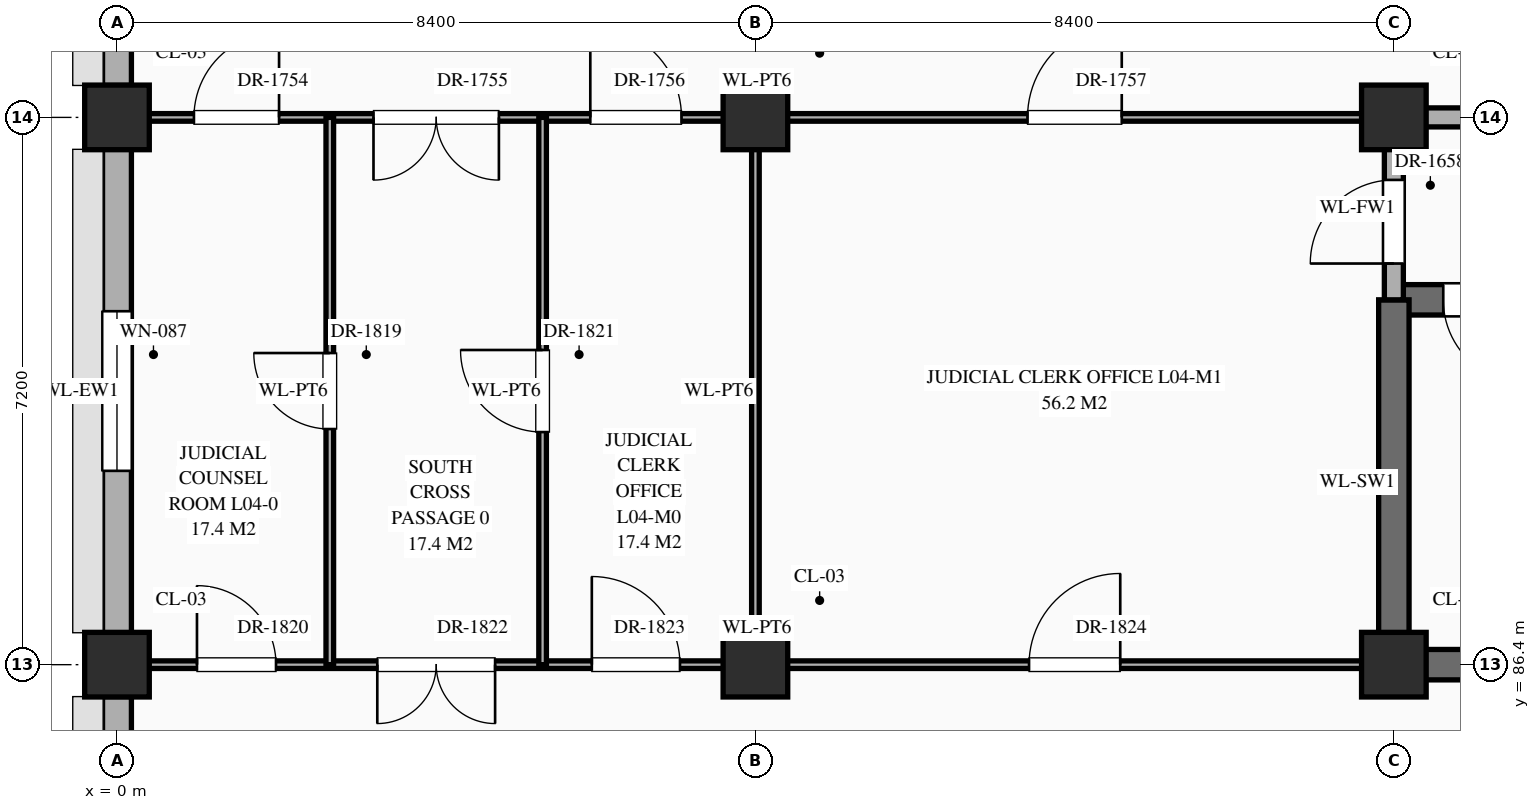
"""IFC4 building model, lengths in metres.
Left out: names, types, materials, properties, quantities, classifications, styles, units other than length and angle.
Written with IfcOpenShell. Run it as: python <this file> out.ifc"""

import sys

from ifc_helpers import new_model, si_unit, direction, frame, frame_2d, origin, origin_2d, place, context, subcontext, project, spatial, rectangle, extrude, element, fill, save


model = new_model("IFC4")
c1 = context("Model", 3, precision=1e-05, world=origin(), true_north=direction((0.0, 1.0)))
c2 = subcontext(c1, "Body", "Model", "MODEL_VIEW")
j1 = project(units=[si_unit("LENGTHUNIT", "METRE"), si_unit("PLANEANGLEUNIT", "RADIAN")], contexts=[c1])
p1 = place(None, origin())
s1 = spatial("IfcSite", under=j1, at=p1, CompositionType="ELEMENT")
p2 = place(p1, origin())
s2 = spatial("IfcBuilding", under=s1, at=p2, CompositionType="ELEMENT")
p3 = place(p2, frame((0.0, 0.0, 16.2)))
s3 = spatial("IfcBuildingStorey", under=s2, at=p3, CompositionType="ELEMENT", Elevation=16.2)
for number, where, z_axis, x_axis in (
    (1, (0.0, 86.4, 0.0), (0.0, 0.0, 1.0), (1.0, 0.0, 0.0)),
    (2, (0.0, 93.6, 0.0), (0.0, 0.0, 1.0), (1.0, 0.0, 0.0)),
    (3, (8.4, 86.4, 0.0), (0.0, 0.0, 1.0), (1.0, 0.0, 0.0)),
    (4, (8.4, 93.6, 0.0), (0.0, 0.0, 1.0), (1.0, 0.0, 0.0)),
    (5, (16.8, 86.4, 0.0), (0.0, 0.0, 1.0), (1.0, 0.0, 0.0)),
    (6, (16.8, 93.6, 0.0), (0.0, 0.0, 1.0), (1.0, 0.0, 0.0)),
):
    element("IfcColumn", number, at=place(p3, frame(where, z_axis=z_axis, x_axis=x_axis)), inside=s3, PredefinedType="COLUMN", context=c2, shape_type="SweptSolid", body=[
        extrude(rectangle(XDim=0.85, YDim=0.85, at=origin_2d()), origin(), (0.0, 0.0, 1.0), 5.4),
    ])
p4 = place(p3, frame((0.0, 79.62, 0.0), z_axis=(0.0, 0.0, 1.0), x_axis=(0.0, 1.0, 0.0)))
e7 = element("IfcWall", 7, at=p4, inside=s3, PredefinedType="STANDARD", context=c2, shape_type="SweptSolid", body=[
    extrude(rectangle(XDim=6.36, YDim=0.38, at=frame_2d((3.18, 0.0))), origin(), (0.0, 0.0, 1.0), 4.55),
])
p5 = place(p4, frame((1.08, 0.0, 0.85)))
e8 = element("IfcOpeningElement", 8, at=p5, cuts=e7, PredefinedType="OPENING", context=c2, shape_type="SweptSolid", body=[
    extrude(rectangle(XDim=1.8, YDim=2.12, at=frame_2d((0.9, 1.06))), frame((0.0, 0.202, 0.0), z_axis=(0.0, -1.0, 0.0), x_axis=(1.0, 0.0, 0.0)), (0.0, 0.0, 1.0), 0.404),
])
p6 = place(p3, frame((0.0, 86.82, 0.0), z_axis=(0.0, 0.0, 1.0), x_axis=(0.0, 1.0, 0.0)))
e9 = element("IfcWall", 9, at=p6, inside=s3, PredefinedType="STANDARD", context=c2, shape_type="SweptSolid", body=[
    extrude(rectangle(XDim=6.36, YDim=0.38, at=frame_2d((3.18, 0.0))), origin(), (0.0, 0.0, 1.0), 4.55),
])
p7 = place(p6, frame((2.13, 0.0, 0.85)))
e10 = element("IfcOpeningElement", 10, at=p7, cuts=e9, PredefinedType="OPENING", context=c2, shape_type="SweptSolid", body=[
    extrude(rectangle(XDim=2.1, YDim=1.2, at=frame_2d((1.05, 0.6))), frame((0.0, 0.202, 0.0), z_axis=(0.0, -1.0, 0.0), x_axis=(1.0, 0.0, 0.0)), (0.0, 0.0, 1.0), 0.404),
])
p8 = place(p3, frame((0.0, 94.02, 0.0), z_axis=(0.0, 0.0, 1.0), x_axis=(0.0, 1.0, 0.0)))
e11 = element("IfcWall", 11, at=p8, inside=s3, PredefinedType="STANDARD", context=c2, shape_type="SweptSolid", body=[
    extrude(rectangle(XDim=6.36, YDim=0.38, at=frame_2d((3.18, 0.0))), origin(), (0.0, 0.0, 1.0), 4.55),
])
p9 = place(p8, frame((3.955, 0.0, 0.85)))
e12 = element("IfcOpeningElement", 12, at=p9, cuts=e11, PredefinedType="OPENING", context=c2, shape_type="SweptSolid", body=[
    extrude(rectangle(XDim=1.05, YDim=1.38, at=frame_2d((0.525, 0.69))), frame((0.0, 0.202, 0.0), z_axis=(0.0, -1.0, 0.0), x_axis=(1.0, 0.0, 0.0)), (0.0, 0.0, 1.0), 0.404),
])
p10 = place(p3, frame((0.04, 86.4, 0.0), z_axis=(0.0, 0.0, 1.0), x_axis=(1.0, 0.0, 0.0)))
e13 = element("IfcWall", 13, at=p10, inside=s3, PredefinedType="STANDARD", context=c2, shape_type="SweptSolid", body=[
    extrude(rectangle(XDim=16.76, YDim=0.1, at=frame_2d((8.38, 0.0))), origin(), (0.0, 0.0, 1.0), 4.35),
])
p11 = place(p10, frame((1.012, 0.0, 0.0)))
e14 = element("IfcOpeningElement", 14, at=p11, cuts=e13, PredefinedType="OPENING", context=c2, shape_type="SweptSolid", body=[
    extrude(rectangle(XDim=1.04, YDim=2.2, at=frame_2d((0.52, 1.1))), frame((0.0, 0.062, 0.0), z_axis=(0.0, -1.0, 0.0), x_axis=(1.0, 0.0, 0.0)), (0.0, 0.0, 1.0), 0.124),
])
p12 = place(p10, frame((3.385, 0.0, 0.0)))
e15 = element("IfcOpeningElement", 15, at=p12, cuts=e13, PredefinedType="OPENING", context=c2, shape_type="SweptSolid", body=[
    extrude(rectangle(XDim=1.55, YDim=2.35, at=frame_2d((0.775, 1.175))), frame((0.0, 0.062, 0.0), z_axis=(0.0, -1.0, 0.0), x_axis=(1.0, 0.0, 0.0)), (0.0, 0.0, 1.0), 0.124),
])
p13 = place(p10, frame((6.208, 0.0, 0.0)))
e16 = element("IfcOpeningElement", 16, at=p13, cuts=e13, PredefinedType="OPENING", context=c2, shape_type="SweptSolid", body=[
    extrude(rectangle(XDim=1.16, YDim=2.3, at=frame_2d((0.58, 1.15))), frame((0.0, 0.062, 0.0), z_axis=(0.0, -1.0, 0.0), x_axis=(1.0, 0.0, 0.0)), (0.0, 0.0, 1.0), 0.124),
])
p14 = place(p10, frame((11.96, 0.0, 0.0)))
e17 = element("IfcOpeningElement", 17, at=p14, cuts=e13, PredefinedType="OPENING", context=c2, shape_type="SweptSolid", body=[
    extrude(rectangle(XDim=1.2, YDim=2.35, at=frame_2d((0.6, 1.175))), frame((0.0, 0.062, 0.0), z_axis=(0.0, -1.0, 0.0), x_axis=(1.0, 0.0, 0.0)), (0.0, 0.0, 1.0), 0.124),
])
p15 = place(p3, frame((16.8, 86.4, 0.0), z_axis=(0.0, 0.0, 1.0), x_axis=(1.0, 0.0, 0.0)))
e18 = element("IfcWall", 18, at=p15, inside=s3, PredefinedType="SHEAR", context=c2, shape_type="SweptSolid", body=[
    extrude(rectangle(XDim=8.4, YDim=0.4, at=frame_2d((4.2, 0.0))), origin(), (0.0, 0.0, 1.0), 5.05),
])
p16 = place(p3, frame((16.8, 91.2, 0.0), z_axis=(0.0, 0.0, 1.0), x_axis=(1.0, 0.0, 0.0)))
e19 = element("IfcWall", 19, at=p16, inside=s3, PredefinedType="SHEAR", context=c2, shape_type="SweptSolid", body=[
    extrude(rectangle(XDim=8.4, YDim=0.4, at=frame_2d((4.2, 0.0))), origin(), (0.0, 0.0, 1.0), 5.05),
])
p17 = place(p16, frame((0.65, 0.0, 0.0)))
e20 = element("IfcOpeningElement", 20, at=p17, cuts=e19, PredefinedType="OPENING", context=c2, shape_type="SweptSolid", body=[
    extrude(rectangle(XDim=1.1, YDim=2.2, at=frame_2d((0.55, 1.1))), frame((0.0, 0.212, 0.0), z_axis=(0.0, -1.0, 0.0), x_axis=(1.0, 0.0, 0.0)), (0.0, 0.0, 1.0), 0.424),
])
p18 = place(p3, frame((0.04, 93.6, 0.0), z_axis=(0.0, 0.0, 1.0), x_axis=(1.0, 0.0, 0.0)))
e21 = element("IfcWall", 21, at=p18, inside=s3, PredefinedType="STANDARD", context=c2, shape_type="SweptSolid", body=[
    extrude(rectangle(XDim=16.76, YDim=0.1, at=frame_2d((8.38, 0.0))), origin(), (0.0, 0.0, 1.0), 4.35),
])
p19 = place(p18, frame((0.972, 0.0, 0.0)))
e22 = element("IfcOpeningElement", 22, at=p19, cuts=e21, PredefinedType="OPENING", context=c2, shape_type="SweptSolid", body=[
    extrude(rectangle(XDim=1.12, YDim=2.25, at=frame_2d((0.56, 1.125))), frame((0.0, 0.062, 0.0), z_axis=(0.0, -1.0, 0.0), x_axis=(1.0, 0.0, 0.0)), (0.0, 0.0, 1.0), 0.124),
])
p20 = place(p18, frame((3.335, 0.0, 0.0)))
e23 = element("IfcOpeningElement", 23, at=p20, cuts=e21, PredefinedType="OPENING", context=c2, shape_type="SweptSolid", body=[
    extrude(rectangle(XDim=1.65, YDim=2.4, at=frame_2d((0.825, 1.2))), frame((0.0, 0.062, 0.0), z_axis=(0.0, -1.0, 0.0), x_axis=(1.0, 0.0, 0.0)), (0.0, 0.0, 1.0), 0.124),
])
p21 = place(p18, frame((6.188, 0.0, 0.0)))
e24 = element("IfcOpeningElement", 24, at=p21, cuts=e21, PredefinedType="OPENING", context=c2, shape_type="SweptSolid", body=[
    extrude(rectangle(XDim=1.2, YDim=2.35, at=frame_2d((0.6, 1.175))), frame((0.0, 0.062, 0.0), z_axis=(0.0, -1.0, 0.0), x_axis=(1.0, 0.0, 0.0)), (0.0, 0.0, 1.0), 0.124),
])
p22 = place(p18, frame((11.94, 0.0, 0.0)))
e25 = element("IfcOpeningElement", 25, at=p22, cuts=e21, PredefinedType="OPENING", context=c2, shape_type="SweptSolid", body=[
    extrude(rectangle(XDim=1.24, YDim=2.3, at=frame_2d((0.62, 1.15))), frame((0.0, 0.062, 0.0), z_axis=(0.0, -1.0, 0.0), x_axis=(1.0, 0.0, 0.0)), (0.0, 0.0, 1.0), 0.124),
])
p23 = place(p3, frame((16.8, 93.6, 0.0), z_axis=(0.0, 0.0, 1.0), x_axis=(1.0, 0.0, 0.0)))
e26 = element("IfcWall", 26, at=p23, inside=s3, PredefinedType="STANDARD", context=c2, shape_type="SweptSolid", body=[
    extrude(rectangle(XDim=8.4, YDim=0.25, at=frame_2d((4.2, 0.0))), origin(), (0.0, 0.0, 1.0), 4.2),
])
p24 = place(p23, frame((3.3, 0.0, 0.0)))
e27 = element("IfcOpeningElement", 27, at=p24, cuts=e26, PredefinedType="OPENING", context=c2, shape_type="SweptSolid", body=[
    extrude(rectangle(XDim=1.8, YDim=2.35, at=frame_2d((0.9, 1.175))), frame((0.0, 0.137, 0.0), z_axis=(0.0, -1.0, 0.0), x_axis=(1.0, 0.0, 0.0)), (0.0, 0.0, 1.0), 0.274),
])
p25 = place(p3, frame((2.8, 86.4, 0.0), z_axis=(0.0, 0.0, 1.0), x_axis=(0.0, 1.0, 0.0)))
e28 = element("IfcWall", 28, at=p25, inside=s3, PredefinedType="STANDARD", context=c2, shape_type="SweptSolid", body=[
    extrude(rectangle(XDim=7.2, YDim=0.1, at=frame_2d((3.6, 0.0))), origin(), (0.0, 0.0, 1.0), 5.2),
])
p26 = place(p25, frame((3.1, 0.0, 0.0)))
e29 = element("IfcOpeningElement", 29, at=p26, cuts=e28, PredefinedType="OPENING", context=c2, shape_type="SweptSolid", body=[
    extrude(rectangle(XDim=1.0, YDim=2.25, at=frame_2d((0.5, 1.125))), frame((0.0, 0.062, 0.0), z_axis=(0.0, -1.0, 0.0), x_axis=(1.0, 0.0, 0.0)), (0.0, 0.0, 1.0), 0.124),
])
p27 = place(p3, frame((5.6, 86.4, 0.0), z_axis=(0.0, 0.0, 1.0), x_axis=(0.0, 1.0, 0.0)))
e30 = element("IfcWall", 30, at=p27, inside=s3, PredefinedType="STANDARD", context=c2, shape_type="SweptSolid", body=[
    extrude(rectangle(XDim=7.2, YDim=0.1, at=frame_2d((3.6, 0.0))), origin(), (0.0, 0.0, 1.0), 5.2),
])
p28 = place(p27, frame((3.06, 0.0, 0.0)))
e31 = element("IfcOpeningElement", 31, at=p28, cuts=e30, PredefinedType="OPENING", context=c2, shape_type="SweptSolid", body=[
    extrude(rectangle(XDim=1.08, YDim=2.25, at=frame_2d((0.54, 1.125))), frame((0.0, 0.062, 0.0), z_axis=(0.0, -1.0, 0.0), x_axis=(1.0, 0.0, 0.0)), (0.0, 0.0, 1.0), 0.124),
])
p29 = place(p3, frame((8.4, 86.4, 0.0), z_axis=(0.0, 0.0, 1.0), x_axis=(0.0, 1.0, 0.0)))
e32 = element("IfcWall", 32, at=p29, inside=s3, PredefinedType="STANDARD", context=c2, shape_type="SweptSolid", body=[
    extrude(rectangle(XDim=7.2, YDim=0.1, at=frame_2d((3.6, 0.0))), origin(), (0.0, 0.0, 1.0), 4.45),
])
p30 = place(p3, frame((16.8, 86.4, 0.0), z_axis=(0.0, 0.0, 1.0), x_axis=(0.0, 1.0, 0.0)))
e33 = element("IfcWall", 33, at=p30, inside=s3, PredefinedType="SHEAR", context=c2, shape_type="SweptSolid", body=[
    extrude(rectangle(XDim=4.8, YDim=0.4, at=frame_2d((2.4, 0.0))), origin(), (0.0, 0.0, 1.0), 5.2),
])
p31 = place(p3, frame((16.8, 91.2, 0.0), z_axis=(0.0, 0.0, 1.0), x_axis=(0.0, 1.0, 0.0)))
e34 = element("IfcWall", 34, at=p31, inside=s3, PredefinedType="STANDARD", context=c2, shape_type="SweptSolid", body=[
    extrude(rectangle(XDim=2.4, YDim=0.25, at=frame_2d((1.2, 0.0))), origin(), (0.0, 0.0, 1.0), 4.3),
])
p32 = place(p31, frame((0.478, 0.0, 0.0)))
e35 = element("IfcOpeningElement", 35, at=p32, cuts=e34, PredefinedType="OPENING", context=c2, shape_type="SweptSolid", body=[
    extrude(rectangle(XDim=1.1, YDim=2.2, at=frame_2d((0.55, 1.1))), frame((0.0, 0.137, 0.0), z_axis=(0.0, -1.0, 0.0), x_axis=(1.0, 0.0, 0.0)), (0.0, 0.0, 1.0), 0.274),
])
p33 = place(p7, origin())
e36 = element("IfcWindow", 36, at=p33, inside=s3, PartitioningType="SINGLE_PANEL", PredefinedType="WINDOW", context=c2, shape_type="SweptSolid", body=[
    extrude(rectangle(XDim=2.1, YDim=1.2, at=frame_2d((1.05, 0.6))), frame((0.0, 0.03, 0.0), z_axis=(0.0, -1.0, 0.0), x_axis=(1.0, 0.0, 0.0)), (0.0, 0.0, 1.0), 0.06),
])
fill(e10, e36)
p34 = place(p17, frame((1.1, 0.0, 0.0), z_axis=(0.0, 0.0, 1.0), x_axis=(-1.0, 0.0, 0.0)))
e37 = element("IfcDoor", 37, at=p34, inside=s3, OperationType="SINGLE_SWING_LEFT", PredefinedType="DOOR", context=c2, shape_type="SweptSolid", body=[
    extrude(rectangle(XDim=1.1, YDim=2.2, at=frame_2d((0.55, 1.1))), frame((0.0, 0.025, 0.0), z_axis=(0.0, -1.0, 0.0), x_axis=(1.0, 0.0, 0.0)), (0.0, 0.0, 1.0), 0.05),
])
fill(e20, e37)
p35 = place(p32, origin())
e38 = element("IfcDoor", 38, at=p35, inside=s3, OperationType="SINGLE_SWING_LEFT", PredefinedType="DOOR", context=c2, shape_type="SweptSolid", body=[
    extrude(rectangle(XDim=1.1, YDim=2.2, at=frame_2d((0.55, 1.1))), frame((0.0, 0.025, 0.0), z_axis=(0.0, -1.0, 0.0), x_axis=(1.0, 0.0, 0.0)), (0.0, 0.0, 1.0), 0.05),
])
fill(e35, e38)
p36 = place(p19, origin())
e39 = element("IfcDoor", 39, at=p36, inside=s3, OperationType="SINGLE_SWING_RIGHT", PredefinedType="DOOR", context=c2, shape_type="SweptSolid", body=[
    extrude(rectangle(XDim=1.12, YDim=2.25, at=frame_2d((0.56, 1.125))), frame((0.0, 0.025, 0.0), z_axis=(0.0, -1.0, 0.0), x_axis=(1.0, 0.0, 0.0)), (0.0, 0.0, 1.0), 0.05),
])
fill(e22, e39)
p37 = place(p20, frame((1.65, 0.0, 0.0), z_axis=(0.0, 0.0, 1.0), x_axis=(-1.0, 0.0, 0.0)))
e40 = element("IfcDoor", 40, at=p37, inside=s3, OperationType="DOUBLE_DOOR_SINGLE_SWING", PredefinedType="DOOR", context=c2, shape_type="SweptSolid", body=[
    extrude(rectangle(XDim=1.65, YDim=2.4, at=frame_2d((0.825, 1.2))), frame((0.0, 0.025, 0.0), z_axis=(0.0, -1.0, 0.0), x_axis=(1.0, 0.0, 0.0)), (0.0, 0.0, 1.0), 0.05),
])
fill(e23, e40)
p38 = place(p21, origin())
e41 = element("IfcDoor", 41, at=p38, inside=s3, OperationType="SINGLE_SWING_LEFT", PredefinedType="DOOR", context=c2, shape_type="SweptSolid", body=[
    extrude(rectangle(XDim=1.2, YDim=2.35, at=frame_2d((0.6, 1.175))), frame((0.0, 0.025, 0.0), z_axis=(0.0, -1.0, 0.0), x_axis=(1.0, 0.0, 0.0)), (0.0, 0.0, 1.0), 0.05),
])
fill(e24, e41)
p39 = place(p22, origin())
e42 = element("IfcDoor", 42, at=p39, inside=s3, OperationType="SINGLE_SWING_RIGHT", PredefinedType="DOOR", context=c2, shape_type="SweptSolid", body=[
    extrude(rectangle(XDim=1.24, YDim=2.3, at=frame_2d((0.62, 1.15))), frame((0.0, 0.025, 0.0), z_axis=(0.0, -1.0, 0.0), x_axis=(1.0, 0.0, 0.0)), (0.0, 0.0, 1.0), 0.05),
])
fill(e25, e42)
p40 = place(p26, origin())
e43 = element("IfcDoor", 43, at=p40, inside=s3, OperationType="SINGLE_SWING_RIGHT", PredefinedType="DOOR", context=c2, shape_type="SweptSolid", body=[
    extrude(rectangle(XDim=1.0, YDim=2.25, at=frame_2d((0.5, 1.125))), frame((0.0, 0.025, 0.0), z_axis=(0.0, -1.0, 0.0), x_axis=(1.0, 0.0, 0.0)), (0.0, 0.0, 1.0), 0.05),
])
fill(e29, e43)
p41 = place(p11, origin())
e44 = element("IfcDoor", 44, at=p41, inside=s3, OperationType="SINGLE_SWING_LEFT", PredefinedType="DOOR", context=c2, shape_type="SweptSolid", body=[
    extrude(rectangle(XDim=1.04, YDim=2.2, at=frame_2d((0.52, 1.1))), frame((0.0, 0.025, 0.0), z_axis=(0.0, -1.0, 0.0), x_axis=(1.0, 0.0, 0.0)), (0.0, 0.0, 1.0), 0.05),
])
fill(e14, e44)
p42 = place(p28, origin())
e45 = element("IfcDoor", 45, at=p42, inside=s3, OperationType="SINGLE_SWING_RIGHT", PredefinedType="DOOR", context=c2, shape_type="SweptSolid", body=[
    extrude(rectangle(XDim=1.08, YDim=2.25, at=frame_2d((0.54, 1.125))), frame((0.0, 0.025, 0.0), z_axis=(0.0, -1.0, 0.0), x_axis=(1.0, 0.0, 0.0)), (0.0, 0.0, 1.0), 0.05),
])
fill(e31, e45)
p43 = place(p12, frame((1.55, 0.0, 0.0), z_axis=(0.0, 0.0, 1.0), x_axis=(-1.0, 0.0, 0.0)))
e46 = element("IfcDoor", 46, at=p43, inside=s3, OperationType="DOUBLE_DOOR_SINGLE_SWING", PredefinedType="DOOR", context=c2, shape_type="SweptSolid", body=[
    extrude(rectangle(XDim=1.55, YDim=2.35, at=frame_2d((0.775, 1.175))), frame((0.0, 0.025, 0.0), z_axis=(0.0, -1.0, 0.0), x_axis=(1.0, 0.0, 0.0)), (0.0, 0.0, 1.0), 0.05),
])
fill(e15, e46)
p44 = place(p13, origin())
e47 = element("IfcDoor", 47, at=p44, inside=s3, OperationType="SINGLE_SWING_LEFT", PredefinedType="DOOR", context=c2, shape_type="SweptSolid", body=[
    extrude(rectangle(XDim=1.16, YDim=2.3, at=frame_2d((0.58, 1.15))), frame((0.0, 0.025, 0.0), z_axis=(0.0, -1.0, 0.0), x_axis=(1.0, 0.0, 0.0)), (0.0, 0.0, 1.0), 0.05),
])
fill(e16, e47)
p45 = place(p14, origin())
e48 = element("IfcDoor", 48, at=p45, inside=s3, OperationType="SINGLE_SWING_RIGHT", PredefinedType="DOOR", context=c2, shape_type="SweptSolid", body=[
    extrude(rectangle(XDim=1.2, YDim=2.35, at=frame_2d((0.6, 1.175))), frame((0.0, 0.025, 0.0), z_axis=(0.0, -1.0, 0.0), x_axis=(1.0, 0.0, 0.0)), (0.0, 0.0, 1.0), 0.05),
])
fill(e17, e48)
save(model, sys.argv[1])
